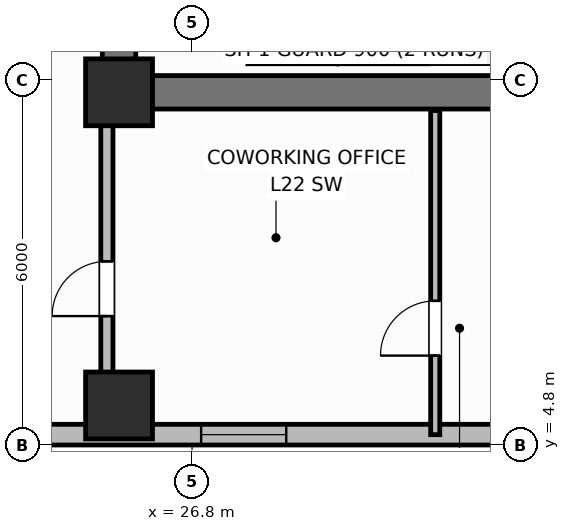
"""IFC4 building model, lengths in metres.
Left out: names, types, materials, properties, quantities, classifications, styles, units other than length and angle.
Written with IfcOpenShell. Run it as: python <this file> out.ifc"""

import sys

from ifc_helpers import new_model, si_unit, direction, frame, frame_2d, origin, origin_2d, place, context, subcontext, project, spatial, rectangle, extrude, element, fill, save


model = new_model("IFC4")
c1 = context("Model", 3, precision=1e-05, world=origin(), true_north=direction((0.0, 1.0)))
c2 = subcontext(c1, "Body", "Model", "MODEL_VIEW")
j1 = project(units=[si_unit("LENGTHUNIT", "METRE"), si_unit("PLANEANGLEUNIT", "RADIAN")], contexts=[c1])
p1 = place(None, origin())
s1 = spatial("IfcSite", under=j1, at=p1, CompositionType="ELEMENT")
p2 = place(p1, origin())
s2 = spatial("IfcBuilding", under=s1, at=p2, CompositionType="ELEMENT")
p3 = place(p2, frame((0.0, 0.0, 92.0)))
s3 = spatial("IfcBuildingStorey", under=s2, at=p3, CompositionType="ELEMENT", Elevation=92.0)
p4 = place(p3, frame((52.8, 10.6, 0.0), z_axis=(0.0, 0.0, 1.0), x_axis=(-1.0, 0.0, 0.0)))
e1 = element("IfcWall", 1, at=p4, inside=s3, PredefinedType="SHEAR", context=c2, shape_type="SweptSolid", body=[
    extrude(rectangle(XDim=27.2, YDim=0.55, at=frame_2d((13.6, 0.0))), origin(), (0.0, 0.0, 1.0), 3.7),
])
p5 = place(p3, frame((25.6, 10.875, 0.0), z_axis=(0.0, 0.0, 1.0), x_axis=(0.0, 1.0, 0.0)))
e2 = element("IfcWall", 2, at=p5, inside=s3, PredefinedType="SHEAR", context=c2, shape_type="SweptSolid", body=[
    extrude(rectangle(XDim=5.65, YDim=0.55, at=frame_2d((2.825, 0.0))), origin(), (0.0, 0.0, 1.0), 3.7),
])
for number, where, z_axis, x_axis in (
    (3, (25.6, 10.6, 0.0), (0.0, 0.0, 1.0), (1.0, 0.0, 0.0)),
    (4, (25.6, 5.45, 0.0), (0.0, 0.0, 1.0), (1.0, 0.0, 0.0)),
):
    element("IfcColumn", number, at=place(p3, frame(where, z_axis=z_axis, x_axis=x_axis)), inside=s3, PredefinedType="COLUMN", context=c2, shape_type="SweptSolid", body=[
        extrude(rectangle(XDim=1.1, YDim=1.1, at=origin_2d()), origin(), (0.0, 0.0, 1.0), 3.7),
    ])
p6 = place(p3, frame((18.6, 4.97, 0.0), z_axis=(0.0, 0.0, 1.0), x_axis=(1.0, 0.0, 0.0)))
e5 = element("IfcWall", 5, at=p6, inside=s3, PredefinedType="SOLIDWALL", context=c2, shape_type="SweptSolid", body=[
    extrude(rectangle(XDim=17.4, YDim=0.34, at=frame_2d((8.7, 0.0))), origin(), (0.0, 0.0, 1.0), 2.7),
])
p7 = place(p6, frame((1.56, 0.0, 0.73)))
e6 = element("IfcOpeningElement", 6, at=p7, cuts=e5, PredefinedType="OPENING", context=c2, shape_type="SweptSolid", body=[
    extrude(rectangle(XDim=1.4, YDim=1.85, at=frame_2d((0.7, 0.925))), frame((0.0, 0.18, 0.0), z_axis=(0.0, -1.0, 0.0), x_axis=(1.0, 0.0, 0.0)), (0.0, 0.0, 1.0), 0.36),
])
p8 = place(p6, frame((8.35, 0.0, 0.73)))
e7 = element("IfcOpeningElement", 7, at=p8, cuts=e5, PredefinedType="OPENING", context=c2, shape_type="SweptSolid", body=[
    extrude(rectangle(XDim=1.4, YDim=1.85, at=frame_2d((0.7, 0.925))), frame((0.0, 0.18, 0.0), z_axis=(0.0, -1.0, 0.0), x_axis=(1.0, 0.0, 0.0)), (0.0, 0.0, 1.0), 0.36),
])
p9 = place(p6, frame((13.74, 0.0, 0.73)))
e8 = element("IfcOpeningElement", 8, at=p9, cuts=e5, PredefinedType="OPENING", context=c2, shape_type="SweptSolid", body=[
    extrude(rectangle(XDim=1.4, YDim=1.85, at=frame_2d((0.7, 0.925))), frame((0.0, 0.18, 0.0), z_axis=(0.0, -1.0, 0.0), x_axis=(1.0, 0.0, 0.0)), (0.0, 0.0, 1.0), 0.36),
])
p10 = place(p3, frame((30.8, 4.97, 0.0), z_axis=(0.0, 0.0, 1.0), x_axis=(0.0, 1.0, 0.0)))
e9 = element("IfcWall", 9, at=p10, inside=s3, PredefinedType="PARTITIONING", context=c2, shape_type="SweptSolid", body=[
    extrude(rectangle(XDim=5.33, YDim=0.15, at=frame_2d((2.665, 0.0))), origin(), (0.0, 0.0, 1.0), 2.53),
])
p11 = place(p10, frame((1.3, 0.0, 0.0)))
e10 = element("IfcOpeningElement", 10, at=p11, cuts=e9, PredefinedType="OPENING", context=c2, shape_type="SweptSolid", body=[
    extrude(rectangle(XDim=0.9, YDim=2.1, at=frame_2d((0.45, 1.05))), frame((0.0, 0.085, 0.0), z_axis=(0.0, -1.0, 0.0), x_axis=(1.0, 0.0, 0.0)), (0.0, 0.0, 1.0), 0.17),
])
p12 = place(p3, frame((25.4, 5.62, 0.0), z_axis=(0.0, 0.0, 1.0), x_axis=(0.0, 1.0, 0.0)))
e11 = element("IfcWall", 11, at=p12, inside=s3, PredefinedType="PARTITIONING", context=c2, shape_type="SweptSolid", body=[
    extrude(rectangle(XDim=4.68, YDim=0.2, at=frame_2d((2.34, 0.0))), origin(), (0.0, 0.0, 1.0), 2.53),
])
p13 = place(p12, frame((1.3, 0.0, 0.0)))
e12 = element("IfcOpeningElement", 12, at=p13, cuts=e11, PredefinedType="OPENING", context=c2, shape_type="SweptSolid", body=[
    extrude(rectangle(XDim=0.9, YDim=2.1, at=frame_2d((0.45, 1.05))), frame((0.0, 0.11, 0.0), z_axis=(0.0, -1.0, 0.0), x_axis=(1.0, 0.0, 0.0)), (0.0, 0.0, 1.0), 0.22),
])
p14 = place(p8, origin())
e13 = element("IfcWindow", 13, at=p14, inside=s3, PartitioningType="SINGLE_PANEL", PredefinedType="WINDOW", context=c2, shape_type="SweptSolid", body=[
    extrude(rectangle(XDim=1.4, YDim=1.85, at=frame_2d((0.7, 0.925))), frame((0.0, 0.03, 0.0), z_axis=(0.0, -1.0, 0.0), x_axis=(1.0, 0.0, 0.0)), (0.0, 0.0, 1.0), 0.06),
])
fill(e7, e13)
p15 = place(p11, origin())
e14 = element("IfcDoor", 14, at=p15, inside=s3, OperationType="SINGLE_SWING_LEFT", PredefinedType="DOOR", context=c2, shape_type="SweptSolid", body=[
    extrude(rectangle(XDim=0.9, YDim=2.1, at=frame_2d((0.45, 1.05))), frame((0.0, 0.025, 0.0), z_axis=(0.0, -1.0, 0.0), x_axis=(1.0, 0.0, 0.0)), (0.0, 0.0, 1.0), 0.05),
])
fill(e10, e14)
p16 = place(p13, origin())
e15 = element("IfcDoor", 15, at=p16, inside=s3, OperationType="SINGLE_SWING_LEFT", PredefinedType="DOOR", context=c2, shape_type="SweptSolid", body=[
    extrude(rectangle(XDim=0.9, YDim=2.1, at=frame_2d((0.45, 1.05))), frame((0.0, 0.025, 0.0), z_axis=(0.0, -1.0, 0.0), x_axis=(1.0, 0.0, 0.0)), (0.0, 0.0, 1.0), 0.05),
])
fill(e12, e15)
save(model, sys.argv[1])
